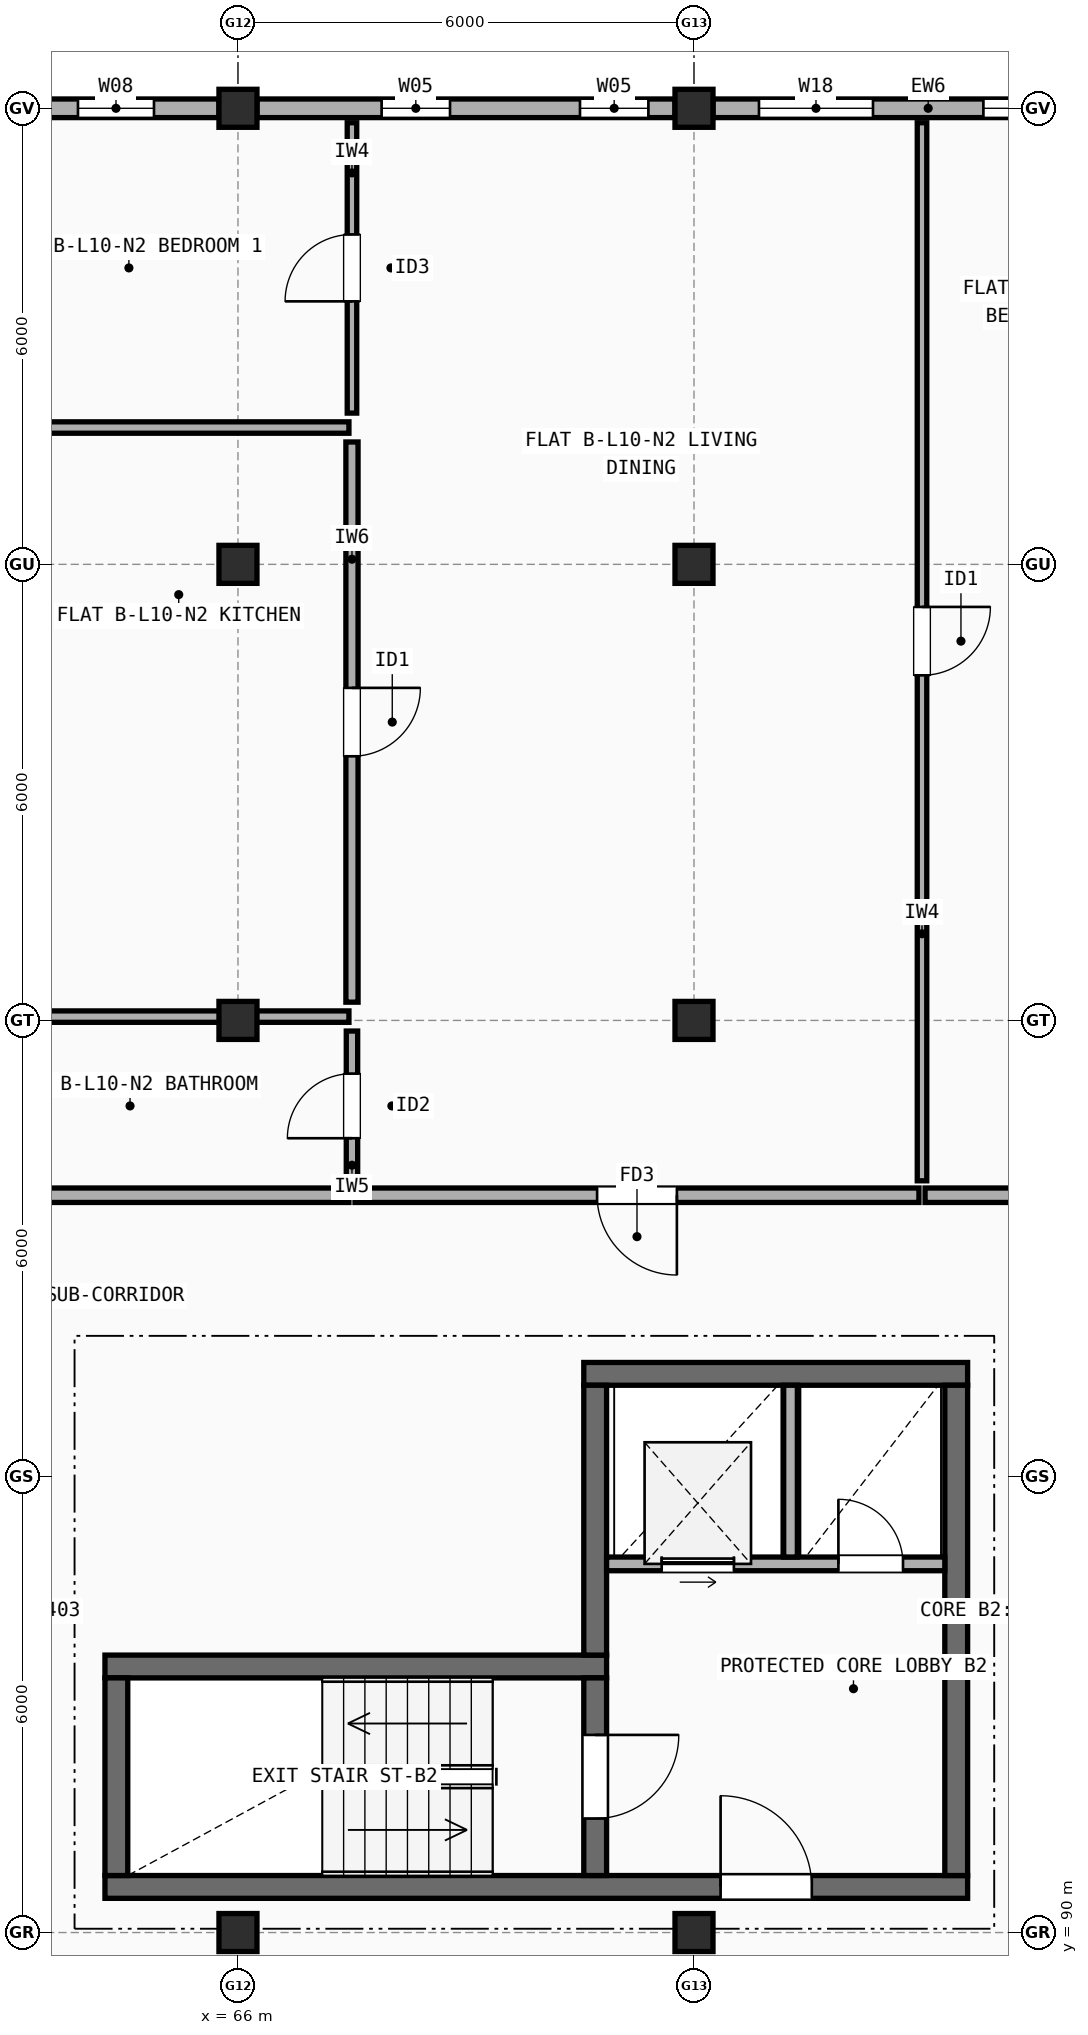
"""IFC4 building model, lengths in metres.
Left out: names, types, materials, properties, quantities, classifications, styles, units other than length and angle.
Written with IfcOpenShell. Run it as: python <this file> out.ifc"""

import sys

from ifc_helpers import new_model, si_unit, direction, frame, frame_2d, origin, origin_2d, place, context, subcontext, project, spatial, rectangle, extrude, element, fill, save


model = new_model("IFC4")
c1 = context("Model", 3, precision=1e-05, world=origin(), true_north=direction((0.0, 1.0)))
c2 = subcontext(c1, "Body", "Model", "MODEL_VIEW")
j1 = project(units=[si_unit("LENGTHUNIT", "METRE"), si_unit("PLANEANGLEUNIT", "RADIAN")], contexts=[c1])
p1 = place(None, origin())
s1 = spatial("IfcSite", under=j1, at=p1, CompositionType="ELEMENT")
p2 = place(p1, origin())
s2 = spatial("IfcBuilding", under=s1, at=p2, CompositionType="ELEMENT")
p3 = place(p2, frame((0.0, 0.0, 33.3)))
s3 = spatial("IfcBuildingStorey", under=s2, at=p3, CompositionType="ELEMENT", Elevation=33.3)
for number, where, z_axis, x_axis in (
    (1, (66.0, 90.0, 0.0), (0.0, 0.0, 1.0), (1.0, 0.0, 0.0)),
    (2, (66.0, 102.0, 0.0), (0.0, 0.0, 1.0), (1.0, 0.0, 0.0)),
    (3, (66.0, 108.0, 0.0), (0.0, 0.0, 1.0), (1.0, 0.0, 0.0)),
    (4, (66.0, 114.0, 0.0), (0.0, 0.0, 1.0), (1.0, 0.0, 0.0)),
    (5, (72.0, 90.0, 0.0), (0.0, 0.0, 1.0), (1.0, 0.0, 0.0)),
    (6, (72.0, 102.0, 0.0), (0.0, 0.0, 1.0), (1.0, 0.0, 0.0)),
    (7, (72.0, 108.0, 0.0), (0.0, 0.0, 1.0), (1.0, 0.0, 0.0)),
    (8, (72.0, 114.0, 0.0), (0.0, 0.0, 1.0), (1.0, 0.0, 0.0)),
):
    element("IfcColumn", number, at=place(p3, frame(where, z_axis=z_axis, x_axis=x_axis)), inside=s3, PredefinedType="COLUMN", context=c2, shape_type="SweptSolid", body=[
        extrude(rectangle(XDim=0.5, YDim=0.5, at=origin_2d()), origin(), (0.0, 0.0, 1.0), 2.99),
    ])
p4 = place(p3, frame((77.775, 114.0, 0.0), z_axis=(0.0, 0.0, 1.0), x_axis=(-1.0, 0.0, 0.0)))
e9 = element("IfcWall", 9, at=p4, inside=s3, PredefinedType="STANDARD", context=c2, shape_type="SweptSolid", body=[
    extrude(rectangle(XDim=5.525, YDim=0.245, at=frame_2d((2.762, 0.0))), origin(), (0.0, 0.0, 1.0), 2.472),
])
p5 = place(p4, frame((0.768, 0.0, 0.9)))
e10 = element("IfcOpeningElement", 10, at=p5, cuts=e9, PredefinedType="OPENING", context=c2, shape_type="SweptSolid", body=[
    extrude(rectangle(XDim=1.2, YDim=1.35, at=frame_2d((0.6, 0.675))), frame((0.0, 0.133, 0.0), z_axis=(0.0, -1.0, 0.0), x_axis=(1.0, 0.0, 0.0)), (0.0, 0.0, 1.0), 0.265),
])
p6 = place(p4, frame((3.42, 0.0, 0.9)))
e11 = element("IfcOpeningElement", 11, at=p6, cuts=e9, PredefinedType="OPENING", context=c2, shape_type="SweptSolid", body=[
    extrude(rectangle(XDim=1.5, YDim=1.4, at=frame_2d((0.75, 0.7))), frame((0.0, 0.133, 0.0), z_axis=(0.0, -1.0, 0.0), x_axis=(1.0, 0.0, 0.0)), (0.0, 0.0, 1.0), 0.265),
])
p7 = place(p3, frame((71.75, 114.0, 0.0), z_axis=(0.0, 0.0, 1.0), x_axis=(-1.0, 0.0, 0.0)))
e12 = element("IfcWall", 12, at=p7, inside=s3, PredefinedType="STANDARD", context=c2, shape_type="SweptSolid", body=[
    extrude(rectangle(XDim=5.5, YDim=0.245, at=frame_2d((2.75, 0.0))), origin(), (0.0, 0.0, 1.0), 2.472),
])
p8 = place(p7, frame((0.35, 0.0, 0.9)))
e13 = element("IfcOpeningElement", 13, at=p8, cuts=e12, PredefinedType="OPENING", context=c2, shape_type="SweptSolid", body=[
    extrude(rectangle(XDim=0.9, YDim=1.4, at=frame_2d((0.45, 0.7))), frame((0.0, 0.133, 0.0), z_axis=(0.0, -1.0, 0.0), x_axis=(1.0, 0.0, 0.0)), (0.0, 0.0, 1.0), 0.265),
])
p9 = place(p7, frame((2.96, 0.0, 0.9)))
e14 = element("IfcOpeningElement", 14, at=p9, cuts=e12, PredefinedType="OPENING", context=c2, shape_type="SweptSolid", body=[
    extrude(rectangle(XDim=0.9, YDim=1.4, at=frame_2d((0.45, 0.7))), frame((0.0, 0.133, 0.0), z_axis=(0.0, -1.0, 0.0), x_axis=(1.0, 0.0, 0.0)), (0.0, 0.0, 1.0), 0.265),
])
p10 = place(p3, frame((65.75, 114.0, 0.0), z_axis=(0.0, 0.0, 1.0), x_axis=(-1.0, 0.0, 0.0)))
e15 = element("IfcWall", 15, at=p10, inside=s3, PredefinedType="STANDARD", context=c2, shape_type="SweptSolid", body=[
    extrude(rectangle(XDim=5.5, YDim=0.245, at=frame_2d((2.75, 0.0))), origin(), (0.0, 0.0, 1.0), 2.472),
])
p11 = place(p10, frame((0.855, 0.0, 0.9)))
e16 = element("IfcOpeningElement", 16, at=p11, cuts=e15, PredefinedType="OPENING", context=c2, shape_type="SweptSolid", body=[
    extrude(rectangle(XDim=1.0, YDim=1.4, at=frame_2d((0.5, 0.7))), frame((0.0, 0.133, 0.0), z_axis=(0.0, -1.0, 0.0), x_axis=(1.0, 0.0, 0.0)), (0.0, 0.0, 1.0), 0.265),
])
p12 = place(p10, frame((3.62, 0.0, 0.9)))
e17 = element("IfcOpeningElement", 17, at=p12, cuts=e15, PredefinedType="OPENING", context=c2, shape_type="SweptSolid", body=[
    extrude(rectangle(XDim=1.05, YDim=1.35, at=frame_2d((0.525, 0.675))), frame((0.0, 0.133, 0.0), z_axis=(0.0, -1.0, 0.0), x_axis=(1.0, 0.0, 0.0)), (0.0, 0.0, 1.0), 0.265),
])
p13 = place(p3, frame((64.25, 90.6, 0.0), z_axis=(0.0, 0.0, 1.0), x_axis=(1.0, 0.0, 0.0)))
e18 = element("IfcWall", 18, at=p13, inside=s3, PredefinedType="SHEAR", context=c2, shape_type="SweptSolid", body=[
    extrude(rectangle(XDim=11.35, YDim=0.3, at=frame_2d((5.675, 0.0))), origin(), (0.0, 0.0, 1.0), 2.99),
])
p14 = place(p13, frame((8.1, 0.0, 0.0)))
e19 = element("IfcOpeningElement", 19, at=p14, cuts=e18, PredefinedType="OPENING", context=c2, shape_type="SweptSolid", body=[
    extrude(rectangle(XDim=1.2, YDim=2.15, at=frame_2d((0.6, 1.075))), frame((0.0, 0.16, 0.0), z_axis=(0.0, -1.0, 0.0), x_axis=(1.0, 0.0, 0.0)), (0.0, 0.0, 1.0), 0.32),
])
p15 = place(p3, frame((70.85, 93.5, 0.0), z_axis=(0.0, 0.0, 1.0), x_axis=(-1.0, 0.0, 0.0)))
e20 = element("IfcWall", 20, at=p15, inside=s3, PredefinedType="SHEAR", context=c2, shape_type="SweptSolid", body=[
    extrude(rectangle(XDim=6.6, YDim=0.3, at=frame_2d((3.3, 0.0))), origin(), (0.0, 0.0, 1.0), 2.99),
])
p16 = place(p3, frame((64.4, 93.35, 0.0), z_axis=(0.0, 0.0, 1.0), x_axis=(0.0, -1.0, 0.0)))
e21 = element("IfcWall", 21, at=p16, inside=s3, PredefinedType="SHEAR", context=c2, shape_type="SweptSolid", body=[
    extrude(rectangle(XDim=2.6, YDim=0.3, at=frame_2d((1.3, 0.0))), origin(), (0.0, 0.0, 1.0), 2.99),
])
p17 = place(p3, frame((70.7, 90.75, 0.0), z_axis=(0.0, 0.0, 1.0), x_axis=(0.0, 1.0, 0.0)))
e22 = element("IfcWall", 22, at=p17, inside=s3, PredefinedType="SHEAR", context=c2, shape_type="SweptSolid", body=[
    extrude(rectangle(XDim=2.6, YDim=0.3, at=frame_2d((1.3, 0.0))), origin(), (0.0, 0.0, 1.0), 2.99),
])
p18 = place(p17, frame((0.75, 0.0, 0.0)))
e23 = element("IfcOpeningElement", 23, at=p18, cuts=e22, PredefinedType="OPENING", context=c2, shape_type="SweptSolid", body=[
    extrude(rectangle(XDim=1.1, YDim=2.15, at=frame_2d((0.55, 1.075))), frame((0.0, 0.16, 0.0), z_axis=(0.0, -1.0, 0.0), x_axis=(1.0, 0.0, 0.0)), (0.0, 0.0, 1.0), 0.32),
])
p19 = place(p3, frame((75.6, 97.35, 0.0), z_axis=(0.0, 0.0, 1.0), x_axis=(-1.0, 0.0, 0.0)))
e24 = element("IfcWall", 24, at=p19, inside=s3, PredefinedType="SHEAR", context=c2, shape_type="SweptSolid", body=[
    extrude(rectangle(XDim=5.05, YDim=0.3, at=frame_2d((2.525, 0.0))), origin(), (0.0, 0.0, 1.0), 2.99),
])
p20 = place(p3, frame((75.45, 90.75, 0.0), z_axis=(0.0, 0.0, 1.0), x_axis=(0.0, 1.0, 0.0)))
e25 = element("IfcWall", 25, at=p20, inside=s3, PredefinedType="SHEAR", context=c2, shape_type="SweptSolid", body=[
    extrude(rectangle(XDim=6.45, YDim=0.3, at=frame_2d((3.225, 0.0))), origin(), (0.0, 0.0, 1.0), 2.99),
])
p21 = place(p3, frame((70.7, 93.65, 0.0), z_axis=(0.0, 0.0, 1.0), x_axis=(0.0, 1.0, 0.0)))
e26 = element("IfcWall", 26, at=p21, inside=s3, PredefinedType="SHEAR", context=c2, shape_type="SweptSolid", body=[
    extrude(rectangle(XDim=3.55, YDim=0.3, at=frame_2d((1.775, 0.0))), origin(), (0.0, 0.0, 1.0), 2.99),
])
p22 = place(p3, frame((70.85, 94.85, 0.0), z_axis=(0.0, 0.0, 1.0), x_axis=(1.0, 0.0, 0.0)))
e27 = element("IfcWall", 27, at=p22, inside=s3, PredefinedType="SOLIDWALL", context=c2, shape_type="SweptSolid", body=[
    extrude(rectangle(XDim=4.45, YDim=0.18, at=frame_2d((2.225, 0.0))), origin(), (0.0, 0.0, 1.0), 2.99),
])
p23 = place(p22, frame((0.725, 0.0, 0.0)))
e28 = element("IfcOpeningElement", 28, at=p23, cuts=e27, PredefinedType="OPENING", context=c2, shape_type="SweptSolid", body=[
    extrude(rectangle(XDim=0.95, YDim=2.15, at=frame_2d((0.475, 1.075))), frame((0.0, 0.1, 0.0), z_axis=(0.0, -1.0, 0.0), x_axis=(1.0, 0.0, 0.0)), (0.0, 0.0, 1.0), 0.2),
])
p24 = place(p22, frame((3.05, 0.0, 0.0)))
e29 = element("IfcOpeningElement", 29, at=p24, cuts=e27, PredefinedType="OPENING", context=c2, shape_type="SweptSolid", body=[
    extrude(rectangle(XDim=0.85, YDim=2.1, at=frame_2d((0.425, 1.05))), frame((0.0, 0.1, 0.0), z_axis=(0.0, -1.0, 0.0), x_axis=(1.0, 0.0, 0.0)), (0.0, 0.0, 1.0), 0.2),
])
p25 = place(p3, frame((73.27, 94.94, 0.0), z_axis=(0.0, 0.0, 1.0), x_axis=(0.0, 1.0, 0.0)))
e30 = element("IfcWall", 30, at=p25, inside=s3, PredefinedType="SOLIDWALL", context=c2, shape_type="SweptSolid", body=[
    extrude(rectangle(XDim=2.26, YDim=0.18, at=frame_2d((1.13, 0.0))), origin(), (0.0, 0.0, 1.0), 2.99),
])
p26 = place(p3, frame((63.04, 99.7, 0.0), z_axis=(0.0, 0.0, 1.0), x_axis=(1.0, 0.0, 0.0)))
e31 = element("IfcWall", 31, at=p26, inside=s3, PredefinedType="SOLIDWALL", context=c2, shape_type="SweptSolid", body=[
    extrude(rectangle(XDim=4.42, YDim=0.19, at=frame_2d((2.21, 0.0))), origin(), (0.0, 0.0, 1.0), 2.99),
])
p27 = place(p3, frame((67.54, 99.7, 0.0), z_axis=(0.0, 0.0, 1.0), x_axis=(1.0, 0.0, 0.0)))
e32 = element("IfcWall", 32, at=p27, inside=s3, PredefinedType="SOLIDWALL", context=c2, shape_type="SweptSolid", body=[
    extrude(rectangle(XDim=7.42, YDim=0.19, at=frame_2d((3.71, 0.0))), origin(), (0.0, 0.0, 1.0), 2.99),
])
p28 = place(p27, frame((3.185, 0.0, 0.0)))
e33 = element("IfcOpeningElement", 33, at=p28, cuts=e32, PredefinedType="OPENING", context=c2, shape_type="SweptSolid", body=[
    extrude(rectangle(XDim=1.05, YDim=2.15, at=frame_2d((0.525, 1.075))), frame((0.0, 0.105, 0.0), z_axis=(0.0, -1.0, 0.0), x_axis=(1.0, 0.0, 0.0)), (0.0, 0.0, 1.0), 0.21),
])
p29 = place(p3, frame((67.5, 109.99, 0.0), z_axis=(0.0, 0.0, 1.0), x_axis=(0.0, 1.0, 0.0)))
e34 = element("IfcWall", 34, at=p29, inside=s3, PredefinedType="PARTITIONING", context=c2, shape_type="SweptSolid", body=[
    extrude(rectangle(XDim=3.82, YDim=0.125, at=frame_2d((1.91, 0.0))), origin(), (0.0, 0.0, 1.0), 2.99),
])
p30 = place(p29, frame((1.47, 0.0, 0.0)))
e35 = element("IfcOpeningElement", 35, at=p30, cuts=e34, PredefinedType="OPENING", context=c2, shape_type="SweptSolid", body=[
    extrude(rectangle(XDim=0.88, YDim=2.1, at=frame_2d((0.44, 1.05))), frame((0.0, 0.073, 0.0), z_axis=(0.0, -1.0, 0.0), x_axis=(1.0, 0.0, 0.0)), (0.0, 0.0, 1.0), 0.145),
])
p31 = place(p3, frame((67.5, 102.24, 0.0), z_axis=(0.0, 0.0, 1.0), x_axis=(0.0, 1.0, 0.0)))
e36 = element("IfcWall", 36, at=p31, inside=s3, PredefinedType="PLUMBINGWALL", context=c2, shape_type="SweptSolid", body=[
    extrude(rectangle(XDim=7.37, YDim=0.16, at=frame_2d((3.685, 0.0))), origin(), (0.0, 0.0, 1.0), 2.472),
])
p32 = place(p31, frame((3.235, 0.0, 0.0)))
e37 = element("IfcOpeningElement", 37, at=p32, cuts=e36, PredefinedType="OPENING", context=c2, shape_type="SweptSolid", body=[
    extrude(rectangle(XDim=0.9, YDim=2.1, at=frame_2d((0.45, 1.05))), frame((0.0, 0.09, 0.0), z_axis=(0.0, -1.0, 0.0), x_axis=(1.0, 0.0, 0.0)), (0.0, 0.0, 1.0), 0.18),
])
p33 = place(p3, frame((67.5, 99.89, 0.0), z_axis=(0.0, 0.0, 1.0), x_axis=(0.0, 1.0, 0.0)))
e38 = element("IfcWall", 38, at=p33, inside=s3, PredefinedType="PARTITIONING", context=c2, shape_type="SweptSolid", body=[
    extrude(rectangle(XDim=1.97, YDim=0.15, at=frame_2d((0.985, 0.0))), origin(), (0.0, 0.0, 1.0), 2.99),
])
p34 = place(p33, frame((0.56, 0.0, 0.0)))
e39 = element("IfcOpeningElement", 39, at=p34, cuts=e38, PredefinedType="OPENING", context=c2, shape_type="SweptSolid", body=[
    extrude(rectangle(XDim=0.85, YDim=2.1, at=frame_2d((0.425, 1.05))), frame((0.0, 0.085, 0.0), z_axis=(0.0, -1.0, 0.0), x_axis=(1.0, 0.0, 0.0)), (0.0, 0.0, 1.0), 0.17),
])
p35 = place(p3, frame((63.04, 109.8, 0.0), z_axis=(0.0, 0.0, 1.0), x_axis=(1.0, 0.0, 0.0)))
e40 = element("IfcWall", 40, at=p35, inside=s3, PredefinedType="PARTITIONING", context=c2, shape_type="SweptSolid", body=[
    extrude(rectangle(XDim=4.42, YDim=0.15, at=frame_2d((2.21, 0.0))), origin(), (0.0, 0.0, 1.0), 2.508),
])
p36 = place(p3, frame((63.04, 102.05, 0.0), z_axis=(0.0, 0.0, 1.0), x_axis=(1.0, 0.0, 0.0)))
e41 = element("IfcWall", 41, at=p36, inside=s3, PredefinedType="PARTITIONING", context=c2, shape_type="SweptSolid", body=[
    extrude(rectangle(XDim=4.42, YDim=0.15, at=frame_2d((2.21, 0.0))), origin(), (0.0, 0.0, 1.0), 2.472),
])
p37 = place(p3, frame((75.04, 99.7, 0.0), z_axis=(0.0, 0.0, 1.0), x_axis=(1.0, 0.0, 0.0)))
e42 = element("IfcWall", 42, at=p37, inside=s3, PredefinedType="SOLIDWALL", context=c2, shape_type="SweptSolid", body=[
    extrude(rectangle(XDim=2.92, YDim=0.19, at=frame_2d((1.46, 0.0))), origin(), (0.0, 0.0, 1.0), 2.472),
])
p38 = place(p3, frame((75.0, 99.89, 0.0), z_axis=(0.0, 0.0, 1.0), x_axis=(0.0, 1.0, 0.0)))
e43 = element("IfcWall", 43, at=p38, inside=s3, PredefinedType="PARTITIONING", context=c2, shape_type="SweptSolid", body=[
    extrude(rectangle(XDim=13.92, YDim=0.125, at=frame_2d((6.96, 0.0))), origin(), (0.0, 0.0, 1.0), 2.472),
])
p39 = place(p38, frame((6.65, 0.0, 0.0)))
e44 = element("IfcOpeningElement", 44, at=p39, cuts=e43, PredefinedType="OPENING", context=c2, shape_type="SweptSolid", body=[
    extrude(rectangle(XDim=0.9, YDim=2.1, at=frame_2d((0.45, 1.05))), frame((0.0, 0.073, 0.0), z_axis=(0.0, -1.0, 0.0), x_axis=(1.0, 0.0, 0.0)), (0.0, 0.0, 1.0), 0.145),
])
p40 = place(p5, origin())
e45 = element("IfcWindow", 45, at=p40, inside=s3, PartitioningType="SINGLE_PANEL", PredefinedType="WINDOW", context=c2, shape_type="SweptSolid", body=[
    extrude(rectangle(XDim=1.2, YDim=1.35, at=frame_2d((0.6, 0.675))), frame((0.0, 0.03, 0.0), z_axis=(0.0, -1.0, 0.0), x_axis=(1.0, 0.0, 0.0)), (0.0, 0.0, 1.0), 0.06),
])
fill(e10, e45)
p41 = place(p6, origin())
e46 = element("IfcWindow", 46, at=p41, inside=s3, PartitioningType="SINGLE_PANEL", PredefinedType="WINDOW", context=c2, shape_type="SweptSolid", body=[
    extrude(rectangle(XDim=1.5, YDim=1.4, at=frame_2d((0.75, 0.7))), frame((0.0, 0.03, 0.0), z_axis=(0.0, -1.0, 0.0), x_axis=(1.0, 0.0, 0.0)), (0.0, 0.0, 1.0), 0.06),
])
fill(e11, e46)
p42 = place(p8, origin())
e47 = element("IfcWindow", 47, at=p42, inside=s3, PartitioningType="SINGLE_PANEL", PredefinedType="WINDOW", context=c2, shape_type="SweptSolid", body=[
    extrude(rectangle(XDim=0.9, YDim=1.4, at=frame_2d((0.45, 0.7))), frame((0.0, 0.03, 0.0), z_axis=(0.0, -1.0, 0.0), x_axis=(1.0, 0.0, 0.0)), (0.0, 0.0, 1.0), 0.06),
])
fill(e13, e47)
p43 = place(p9, origin())
e48 = element("IfcWindow", 48, at=p43, inside=s3, PartitioningType="SINGLE_PANEL", PredefinedType="WINDOW", context=c2, shape_type="SweptSolid", body=[
    extrude(rectangle(XDim=0.9, YDim=1.4, at=frame_2d((0.45, 0.7))), frame((0.0, 0.03, 0.0), z_axis=(0.0, -1.0, 0.0), x_axis=(1.0, 0.0, 0.0)), (0.0, 0.0, 1.0), 0.06),
])
fill(e14, e48)
p44 = place(p11, origin())
e49 = element("IfcWindow", 49, at=p44, inside=s3, PartitioningType="SINGLE_PANEL", PredefinedType="WINDOW", context=c2, shape_type="SweptSolid", body=[
    extrude(rectangle(XDim=1.0, YDim=1.4, at=frame_2d((0.5, 0.7))), frame((0.0, 0.03, 0.0), z_axis=(0.0, -1.0, 0.0), x_axis=(1.0, 0.0, 0.0)), (0.0, 0.0, 1.0), 0.06),
])
fill(e16, e49)
p45 = place(p14, origin())
e50 = element("IfcDoor", 50, at=p45, inside=s3, OperationType="SINGLE_SWING_LEFT", PredefinedType="DOOR", context=c2, shape_type="SweptSolid", body=[
    extrude(rectangle(XDim=1.2, YDim=2.15, at=frame_2d((0.6, 1.075))), frame((0.0, 0.025, 0.0), z_axis=(0.0, -1.0, 0.0), x_axis=(1.0, 0.0, 0.0)), (0.0, 0.0, 1.0), 0.05),
])
fill(e19, e50)
p46 = place(p18, origin())
e51 = element("IfcDoor", 51, at=p46, inside=s3, OperationType="SINGLE_SWING_RIGHT", PredefinedType="DOOR", context=c2, shape_type="SweptSolid", body=[
    extrude(rectangle(XDim=1.1, YDim=2.15, at=frame_2d((0.55, 1.075))), frame((0.0, 0.025, 0.0), z_axis=(0.0, -1.0, 0.0), x_axis=(1.0, 0.0, 0.0)), (0.0, 0.0, 1.0), 0.05),
])
fill(e23, e51)
p47 = place(p23, origin())
e52 = element("IfcDoor", 52, at=p47, inside=s3, OperationType="SLIDING_TO_LEFT", PredefinedType="DOOR", context=c2, shape_type="SweptSolid", body=[
    extrude(rectangle(XDim=0.95, YDim=2.15, at=frame_2d((0.475, 1.075))), frame((0.0, 0.025, 0.0), z_axis=(0.0, -1.0, 0.0), x_axis=(1.0, 0.0, 0.0)), (0.0, 0.0, 1.0), 0.05),
])
fill(e28, e52)
p48 = place(p24, frame((0.85, 0.0, 0.0), z_axis=(0.0, 0.0, 1.0), x_axis=(-1.0, 0.0, 0.0)))
e53 = element("IfcDoor", 53, at=p48, inside=s3, OperationType="SINGLE_SWING_LEFT", PredefinedType="DOOR", context=c2, shape_type="SweptSolid", body=[
    extrude(rectangle(XDim=0.85, YDim=2.1, at=frame_2d((0.425, 1.05))), frame((0.0, 0.025, 0.0), z_axis=(0.0, -1.0, 0.0), x_axis=(1.0, 0.0, 0.0)), (0.0, 0.0, 1.0), 0.05),
])
fill(e29, e53)
p49 = place(p28, origin())
e54 = element("IfcDoor", 54, at=p49, inside=s3, OperationType="SINGLE_SWING_RIGHT", PredefinedType="DOOR", context=c2, shape_type="SweptSolid", body=[
    extrude(rectangle(XDim=1.05, YDim=2.15, at=frame_2d((0.525, 1.075))), frame((0.0, 0.025, 0.0), z_axis=(0.0, -1.0, 0.0), x_axis=(1.0, 0.0, 0.0)), (0.0, 0.0, 1.0), 0.05),
])
fill(e33, e54)
p50 = place(p30, origin())
e55 = element("IfcDoor", 55, at=p50, inside=s3, OperationType="SINGLE_SWING_LEFT", PredefinedType="DOOR", context=c2, shape_type="SweptSolid", body=[
    extrude(rectangle(XDim=0.88, YDim=2.1, at=frame_2d((0.44, 1.05))), frame((0.0, 0.025, 0.0), z_axis=(0.0, -1.0, 0.0), x_axis=(1.0, 0.0, 0.0)), (0.0, 0.0, 1.0), 0.05),
])
fill(e35, e55)
p51 = place(p32, origin())
e56 = element("IfcDoor", 56, at=p51, inside=s3, OperationType="SINGLE_SWING_RIGHT", PredefinedType="DOOR", context=c2, shape_type="SweptSolid", body=[
    extrude(rectangle(XDim=0.9, YDim=2.1, at=frame_2d((0.45, 1.05))), frame((0.0, 0.025, 0.0), z_axis=(0.0, -1.0, 0.0), x_axis=(1.0, 0.0, 0.0)), (0.0, 0.0, 1.0), 0.05),
])
fill(e37, e56)
p52 = place(p34, origin())
e57 = element("IfcDoor", 57, at=p52, inside=s3, OperationType="SINGLE_SWING_LEFT", PredefinedType="DOOR", context=c2, shape_type="SweptSolid", body=[
    extrude(rectangle(XDim=0.85, YDim=2.1, at=frame_2d((0.425, 1.05))), frame((0.0, 0.025, 0.0), z_axis=(0.0, -1.0, 0.0), x_axis=(1.0, 0.0, 0.0)), (0.0, 0.0, 1.0), 0.05),
])
fill(e39, e57)
p53 = place(p39, origin())
e58 = element("IfcDoor", 58, at=p53, inside=s3, OperationType="SINGLE_SWING_RIGHT", PredefinedType="DOOR", context=c2, shape_type="SweptSolid", body=[
    extrude(rectangle(XDim=0.9, YDim=2.1, at=frame_2d((0.45, 1.05))), frame((0.0, 0.025, 0.0), z_axis=(0.0, -1.0, 0.0), x_axis=(1.0, 0.0, 0.0)), (0.0, 0.0, 1.0), 0.05),
])
fill(e44, e58)
save(model, sys.argv[1])
